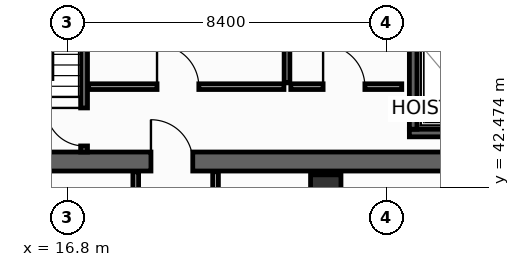
"""IFC4 building model, lengths in metres.
Left out: names, types, materials, properties, quantities, classifications, styles, units other than length and angle.
Written with IfcOpenShell. Run it as: python <this file> out.ifc"""

import sys

from ifc_helpers import new_model, si_unit, direction, frame, frame_2d, origin, origin_2d, place, context, subcontext, project, spatial, rectangle, hollow_rectangle, extrude, element, fill, save


model = new_model("IFC4")
c1 = context("Model", 3, precision=1e-05, world=origin(), true_north=direction((0.0, 1.0)))
c2 = subcontext(c1, "Body", "Model", "MODEL_VIEW")
j1 = project(units=[si_unit("LENGTHUNIT", "METRE"), si_unit("PLANEANGLEUNIT", "RADIAN")], contexts=[c1])
p1 = place(None, origin())
s1 = spatial("IfcSite", under=j1, at=p1, CompositionType="ELEMENT")
p2 = place(p1, origin())
s2 = spatial("IfcBuilding", under=s1, at=p2, CompositionType="ELEMENT")
p3 = place(p2, frame((0.0, 0.0, 190.4)))
s3 = spatial("IfcBuildingStorey", under=s2, at=p3, CompositionType="ELEMENT", Elevation=190.4)
p4 = place(p3, frame((13.6, 43.15, 0.0), z_axis=(0.0, 0.0, 1.0), x_axis=(1.0, 0.0, 0.0)))
e1 = element("IfcWall", 1, at=p4, inside=s3, PredefinedType="SHEAR", context=c2, shape_type="SweptSolid", body=[
    extrude(rectangle(XDim=32.7, YDim=0.5, at=frame_2d((16.35, 0.0))), origin(), (0.0, 0.0, 1.0), 3.55),
])
p5 = place(p4, frame((5.4, 0.0, 0.0)))
e2 = element("IfcOpeningElement", 2, at=p5, cuts=e1, PredefinedType="OPENING", context=c2, shape_type="SweptSolid", body=[
    extrude(rectangle(XDim=1.1, YDim=2.15, at=frame_2d((0.55, 1.075))), frame((0.0, 0.26, 0.0), z_axis=(0.0, -1.0, 0.0), x_axis=(1.0, 0.0, 0.0)), (0.0, 0.0, 1.0), 0.52),
])
p6 = place(p4, frame((25.6, 0.0, 0.0)))
e3 = element("IfcOpeningElement", 3, at=p6, cuts=e1, PredefinedType="OPENING", context=c2, shape_type="SweptSolid", body=[
    extrude(rectangle(XDim=1.1, YDim=2.15, at=frame_2d((0.55, 1.075))), frame((0.0, 0.26, 0.0), z_axis=(0.0, -1.0, 0.0), x_axis=(1.0, 0.0, 0.0)), (0.0, 0.0, 1.0), 0.52),
])
p7 = place(p3, frame((23.6, 42.4, 0.0), z_axis=(0.0, 0.0, 1.0), x_axis=(1.0, 0.0, 0.0)))
e4 = element("IfcColumn", 4, at=p7, inside=s3, PredefinedType="COLUMN", context=c2, shape_type="SweptSolid", body=[
    extrude(hollow_rectangle(XDim=0.8, YDim=0.8, WallThickness=0.036, at=origin_2d()), origin(), (0.0, 0.0, 1.0), 3.8),
])
p8 = place(p3, frame((25.8, 43.9, 0.0), z_axis=(0.0, 0.0, 1.0), x_axis=(1.0, 0.0, 0.0)))
e5 = element("IfcWall", 5, at=p8, inside=s3, PredefinedType="SHEAR", context=c2, shape_type="SweptSolid", body=[
    extrude(rectangle(XDim=2.575, YDim=0.2, at=frame_2d((1.288, 0.0))), origin(), (0.0, 0.0, 1.0), 3.55),
])
p9 = place(p3, frame((25.9, 44.0, 0.0), z_axis=(0.0, 0.0, 1.0), x_axis=(0.0, 1.0, 0.0)))
e6 = element("IfcWall", 6, at=p9, inside=s3, PredefinedType="SHEAR", context=c2, shape_type="SweptSolid", body=[
    extrude(rectangle(XDim=2.3, YDim=0.2, at=frame_2d((1.15, 0.0))), origin(), (0.0, 0.0, 1.0), 3.55),
])
p10 = place(p3, frame((17.24, 43.4, 0.0), z_axis=(0.0, 0.0, 1.0), x_axis=(0.0, 1.0, 0.0)))
e7 = element("IfcWall", 7, at=p10, inside=s3, PredefinedType="SHEAR", context=c2, shape_type="SweptSolid", body=[
    extrude(rectangle(XDim=10.4, YDim=0.18, at=frame_2d((5.2, 0.0))), origin(), (0.0, 0.0, 1.0), 3.55),
])
p11 = place(p10, frame((0.16, 0.0, 0.0)))
e8 = element("IfcOpeningElement", 8, at=p11, cuts=e7, PredefinedType="OPENING", context=c2, shape_type="SweptSolid", body=[
    extrude(rectangle(XDim=1.0, YDim=2.15, at=frame_2d((0.5, 1.075))), frame((0.0, 0.1, 0.0), z_axis=(0.0, -1.0, 0.0), x_axis=(1.0, 0.0, 0.0)), (0.0, 0.0, 1.0), 0.2),
])
p12 = place(p3, frame((17.36, 45.12, 0.0), z_axis=(0.0, 0.0, 1.0), x_axis=(1.0, 0.0, 0.0)))
e9 = element("IfcWall", 9, at=p12, inside=s3, PredefinedType="PARTITIONING", context=c2, shape_type="SweptSolid", body=[
    extrude(rectangle(XDim=5.14, YDim=0.15, at=frame_2d((2.57, 0.0))), origin(), (0.0, 0.0, 1.0), 3.55),
])
p13 = place(p12, frame((1.8, 0.0, 0.0)))
e10 = element("IfcOpeningElement", 10, at=p13, cuts=e9, PredefinedType="OPENING", context=c2, shape_type="SweptSolid", body=[
    extrude(rectangle(XDim=1.1, YDim=2.15, at=frame_2d((0.55, 1.075))), frame((0.0, 0.085, 0.0), z_axis=(0.0, -1.0, 0.0), x_axis=(1.0, 0.0, 0.0)), (0.0, 0.0, 1.0), 0.17),
])
p14 = place(p3, frame((22.58, 50.55, 0.0), z_axis=(0.0, 0.0, 1.0), x_axis=(0.0, -1.0, 0.0)))
e11 = element("IfcWall", 11, at=p14, inside=s3, PredefinedType="PARTITIONING", context=c2, shape_type="SweptSolid", body=[
    extrude(rectangle(XDim=5.33, YDim=0.15, at=frame_2d((2.665, 0.0))), origin(), (0.0, 0.0, 1.0), 3.55),
])
p15 = place(p14, frame((1.8, 0.0, 0.0)))
e12 = element("IfcOpeningElement", 12, at=p15, cuts=e11, PredefinedType="OPENING", context=c2, shape_type="SweptSolid", body=[
    extrude(rectangle(XDim=1.1, YDim=2.15, at=frame_2d((0.55, 1.075))), frame((0.0, 0.085, 0.0), z_axis=(0.0, -1.0, 0.0), x_axis=(1.0, 0.0, 0.0)), (0.0, 0.0, 1.0), 0.17),
])
p16 = place(p3, frame((22.68, 45.12, 0.0), z_axis=(0.0, 0.0, 1.0), x_axis=(1.0, 0.0, 0.0)))
e13 = element("IfcWall", 13, at=p16, inside=s3, PredefinedType="PARTITIONING", context=c2, shape_type="SweptSolid", body=[
    extrude(rectangle(XDim=2.92, YDim=0.15, at=frame_2d((1.46, 0.0))), origin(), (0.0, 0.0, 1.0), 3.55),
])
p17 = place(p16, frame((0.85, 0.0, 0.0)))
e14 = element("IfcOpeningElement", 14, at=p17, cuts=e13, PredefinedType="OPENING", context=c2, shape_type="SweptSolid", body=[
    extrude(rectangle(XDim=1.1, YDim=2.15, at=frame_2d((0.55, 1.075))), frame((0.0, 0.085, 0.0), z_axis=(0.0, -1.0, 0.0), x_axis=(1.0, 0.0, 0.0)), (0.0, 0.0, 1.0), 0.17),
])
for number, where, z_axis, x_axis in (
    (15, (18.6, 41.15, 0.0), (0.0, 0.0, 1.0), (0.0, 1.0, 0.0)),
    (16, (20.7, 41.15, 0.0), (0.0, 0.0, 1.0), (0.0, 1.0, 0.0)),
):
    element("IfcWall", number, at=place(p3, frame(where, z_axis=z_axis, x_axis=x_axis)), inside=s3, PredefinedType="PARTITIONING", context=c2, shape_type="SweptSolid", body=[
        extrude(rectangle(XDim=1.73, YDim=0.15, at=frame_2d((0.865, 0.0))), origin(), (0.0, 0.0, 1.0), 3.55),
    ])
p18 = place(p11, origin())
e17 = element("IfcDoor", 17, at=p18, inside=s3, OperationType="SINGLE_SWING_RIGHT", PredefinedType="DOOR", context=c2, shape_type="SweptSolid", body=[
    extrude(rectangle(XDim=1.0, YDim=2.15, at=frame_2d((0.5, 1.075))), frame((0.0, 0.025, 0.0), z_axis=(0.0, -1.0, 0.0), x_axis=(1.0, 0.0, 0.0)), (0.0, 0.0, 1.0), 0.05),
])
fill(e8, e17)
p19 = place(p13, origin())
e18 = element("IfcDoor", 18, at=p19, inside=s3, OperationType="SINGLE_SWING_LEFT", PredefinedType="DOOR", context=c2, shape_type="SweptSolid", body=[
    extrude(rectangle(XDim=1.1, YDim=2.15, at=frame_2d((0.55, 1.075))), frame((0.0, 0.025, 0.0), z_axis=(0.0, -1.0, 0.0), x_axis=(1.0, 0.0, 0.0)), (0.0, 0.0, 1.0), 0.05),
])
fill(e10, e18)
p20 = place(p17, origin())
e19 = element("IfcDoor", 19, at=p20, inside=s3, OperationType="SINGLE_SWING_LEFT", PredefinedType="DOOR", context=c2, shape_type="SweptSolid", body=[
    extrude(rectangle(XDim=1.1, YDim=2.15, at=frame_2d((0.55, 1.075))), frame((0.0, 0.025, 0.0), z_axis=(0.0, -1.0, 0.0), x_axis=(1.0, 0.0, 0.0)), (0.0, 0.0, 1.0), 0.05),
])
fill(e14, e19)
p21 = place(p5, origin())
e20 = element("IfcDoor", 20, at=p21, inside=s3, OperationType="SINGLE_SWING_LEFT", PredefinedType="DOOR", context=c2, shape_type="SweptSolid", body=[
    extrude(rectangle(XDim=1.1, YDim=2.15, at=frame_2d((0.55, 1.075))), frame((0.0, 0.025, 0.0), z_axis=(0.0, -1.0, 0.0), x_axis=(1.0, 0.0, 0.0)), (0.0, 0.0, 1.0), 0.05),
])
fill(e2, e20)
save(model, sys.argv[1])
